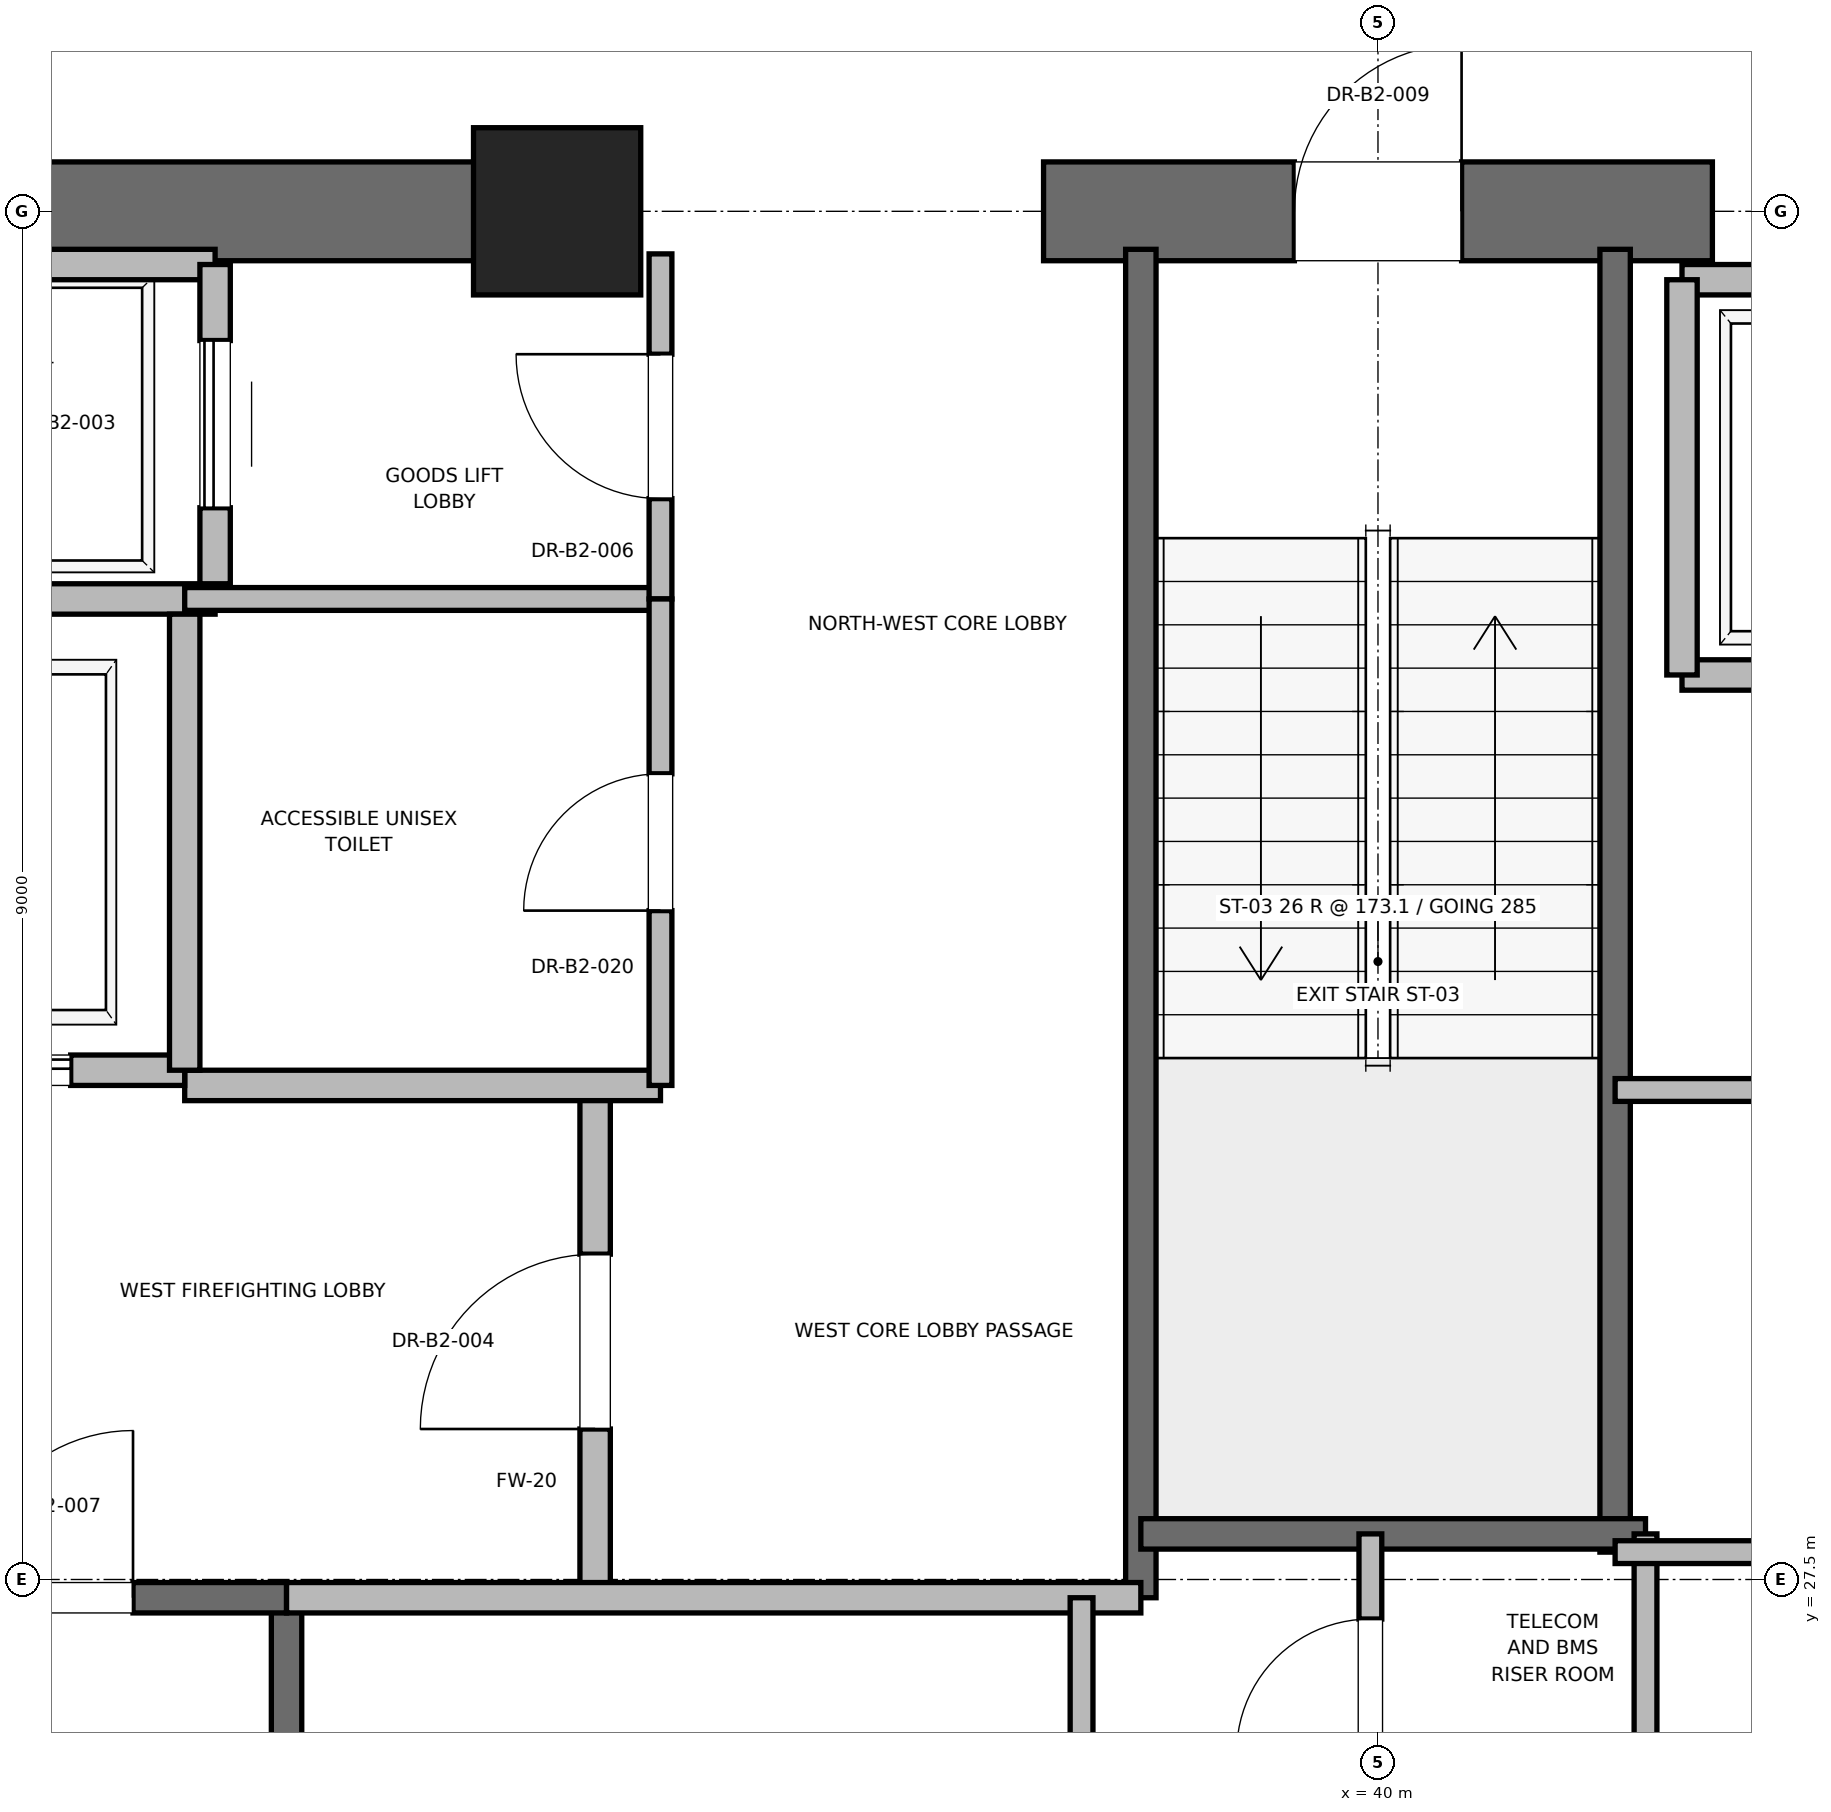
"""IFC4 building model, lengths in metres.
Left out: names, types, materials, properties, quantities, classifications, styles, units other than length and angle.
Written with IfcOpenShell. Run it as: python <this file> out.ifc"""

import sys

from ifc_helpers import new_model, si_unit, direction, frame, frame_2d, origin, origin_2d, place, context, subcontext, project, spatial, rectangle, extrude, element, fill, save


model = new_model("IFC4")
c1 = context("Model", 3, precision=1e-05, world=origin(), true_north=direction((0.0, 1.0)))
c2 = subcontext(c1, "Body", "Model", "MODEL_VIEW")
j1 = project(units=[si_unit("LENGTHUNIT", "METRE"), si_unit("PLANEANGLEUNIT", "RADIAN")], contexts=[c1])
p1 = place(None, origin())
s1 = spatial("IfcSite", under=j1, at=p1, CompositionType="ELEMENT")
p2 = place(p1, origin())
s2 = spatial("IfcBuilding", under=s1, at=p2, CompositionType="ELEMENT")
p3 = place(p2, frame((0.0, 0.0, -9.0)))
s3 = spatial("IfcBuildingStorey", under=s2, at=p3, CompositionType="ELEMENT", Elevation=-9.0)
p4 = place(p3, frame((34.6, 36.5, -0.3), z_axis=(0.0, 0.0, 1.0), x_axis=(1.0, 0.0, 0.0)))
e1 = element("IfcColumn", 1, at=p4, inside=s3, PredefinedType="PILASTER", context=c2, shape_type="SweptSolid", body=[
    extrude(rectangle(XDim=1.1, YDim=1.1, at=origin_2d()), origin(), (0.0, 0.0, 1.0), 4.8),
])
p5 = place(p3, frame((29.0, 36.5, -0.3), z_axis=(0.0, 0.0, 1.0), x_axis=(1.0, 0.0, 0.0)))
e2 = element("IfcWall", 2, at=p5, inside=s3, PredefinedType="SHEAR", context=c2, shape_type="SweptSolid", body=[
    extrude(rectangle(XDim=5.8, YDim=0.65, at=frame_2d((2.9, 0.0))), origin(), (0.0, 0.0, 1.0), 4.5),
])
p6 = place(p3, frame((37.8, 36.5, -0.3), z_axis=(0.0, 0.0, 1.0), x_axis=(1.0, 0.0, 0.0)))
e3 = element("IfcWall", 3, at=p6, inside=s3, PredefinedType="SHEAR", context=c2, shape_type="SweptSolid", body=[
    extrude(rectangle(XDim=4.4, YDim=0.65, at=frame_2d((2.2, 0.0))), origin(), (0.0, 0.0, 1.0), 4.5),
])
p7 = place(p6, frame((1.65, 0.0, 0.3)))
e4 = element("IfcOpeningElement", 4, at=p7, cuts=e3, PredefinedType="OPENING", context=c2, shape_type="SweptSolid", body=[
    extrude(rectangle(XDim=1.1, YDim=2.15, at=frame_2d((0.55, 1.075))), frame((0.0, 0.325, 0.0), z_axis=(0.0, -1.0, 0.0), x_axis=(1.0, 0.0, 0.0)), (0.0, 0.0, 1.0), 0.65),
])
p8 = place(p3, frame((32.82, 18.6, -0.3), z_axis=(0.0, 0.0, 1.0), x_axis=(0.0, 1.0, 0.0)))
e5 = element("IfcWall", 5, at=p8, inside=s3, PredefinedType="SOLIDWALL", context=c2, shape_type="SweptSolid", body=[
    extrude(rectangle(XDim=8.78, YDim=0.2, at=frame_2d((4.39, 0.0))), origin(), (0.0, 0.0, 1.0), 4.5),
])
p9 = place(p3, frame((29.7, 27.38, -0.3), z_axis=(0.0, 0.0, 1.0), x_axis=(1.0, 0.0, 0.0)))
e6 = element("IfcWall", 6, at=p9, inside=s3, PredefinedType="SOLIDWALL", context=c2, shape_type="SweptSolid", body=[
    extrude(rectangle(XDim=3.12, YDim=0.2, at=frame_2d((1.56, 0.0))), origin(), (0.0, 0.0, 1.0), 4.5),
])
p10 = place(p9, frame((1.01, 0.0, 0.3)))
e7 = element("IfcOpeningElement", 7, at=p10, cuts=e6, PredefinedType="OPENING", context=c2, shape_type="SweptSolid", body=[
    extrude(rectangle(XDim=1.1, YDim=2.15, at=frame_2d((0.55, 1.075))), frame((0.0, 0.1, 0.0), z_axis=(0.0, -1.0, 0.0), x_axis=(1.0, 0.0, 0.0)), (0.0, 0.0, 1.0), 0.2),
])
p11 = place(p3, frame((38.44, 27.38, -0.3), z_axis=(0.0, 0.0, 1.0), x_axis=(0.0, 1.0, 0.0)))
e8 = element("IfcWall", 8, at=p11, inside=s3, PredefinedType="SOLIDWALL", context=c2, shape_type="SweptSolid", body=[
    extrude(rectangle(XDim=8.87, YDim=0.2, at=frame_2d((4.435, 0.0))), origin(), (0.0, 0.0, 1.0), 4.5),
])
p12 = place(p3, frame((41.56, 27.68, -0.3), z_axis=(0.0, 0.0, 1.0), x_axis=(0.0, 1.0, 0.0)))
e9 = element("IfcWall", 9, at=p12, inside=s3, PredefinedType="SOLIDWALL", context=c2, shape_type="SweptSolid", body=[
    extrude(rectangle(XDim=8.57, YDim=0.2, at=frame_2d((4.285, 0.0))), origin(), (0.0, 0.0, 1.0), 4.5),
])
p13 = place(p3, frame((38.44, 27.8, -0.3), z_axis=(0.0, 0.0, 1.0), x_axis=(1.0, 0.0, 0.0)))
e10 = element("IfcWall", 10, at=p13, inside=s3, PredefinedType="SOLIDWALL", context=c2, shape_type="SweptSolid", body=[
    extrude(rectangle(XDim=3.32, YDim=0.2, at=frame_2d((1.66, 0.0))), origin(), (0.0, 0.0, 1.0), 4.5),
])
p14 = place(p3, frame((34.85, 27.38, 0.0), z_axis=(0.0, 0.0, 1.0), x_axis=(0.0, 1.0, 0.0)))
e11 = element("IfcWall", 11, at=p14, inside=s3, PredefinedType="PARTITIONING", context=c2, shape_type="SweptSolid", body=[
    extrude(rectangle(XDim=3.37, YDim=0.2, at=frame_2d((1.685, 0.0))), origin(), (0.0, 0.0, 1.0), 4.2),
])
p15 = place(p14, frame((1.11, 0.0, 0.0)))
e12 = element("IfcOpeningElement", 12, at=p15, cuts=e11, PredefinedType="OPENING", context=c2, shape_type="SweptSolid", body=[
    extrude(rectangle(XDim=1.15, YDim=2.2, at=frame_2d((0.575, 1.1))), frame((0.0, 0.1, 0.0), z_axis=(0.0, -1.0, 0.0), x_axis=(1.0, 0.0, 0.0)), (0.0, 0.0, 1.0), 0.2),
])
p16 = place(p3, frame((32.82, 27.38, 0.0), z_axis=(0.0, 0.0, 1.0), x_axis=(1.0, 0.0, 0.0)))
e13 = element("IfcWall", 13, at=p16, inside=s3, PredefinedType="PARTITIONING", context=c2, shape_type="SweptSolid", body=[
    extrude(rectangle(XDim=5.62, YDim=0.2, at=frame_2d((2.81, 0.0))), origin(), (0.0, 0.0, 1.0), 4.2),
])
p17 = place(p3, frame((32.15, 30.75, 0.0), z_axis=(0.0, 0.0, 1.0), x_axis=(1.0, 0.0, 0.0)))
e14 = element("IfcWall", 14, at=p17, inside=s3, PredefinedType="PARTITIONING", context=c2, shape_type="SweptSolid", body=[
    extrude(rectangle(XDim=3.13, YDim=0.2, at=frame_2d((1.565, 0.0))), origin(), (0.0, 0.0, 1.0), 4.2),
])
p18 = place(p3, frame((29.55, 30.85, 0.0), z_axis=(0.0, 0.0, 1.0), x_axis=(1.0, 0.0, 0.0)))
e15 = element("IfcWall", 15, at=p18, inside=s3, PredefinedType="SOLIDWALL", context=c2, shape_type="SweptSolid", body=[
    extrude(rectangle(XDim=2.6, YDim=0.2, at=frame_2d((1.3, 0.0))), origin(), (0.0, 0.0, 1.0), 2.98),
])
p19 = place(p18, frame((0.75, 0.0, 0.0)))
e16 = element("IfcOpeningElement", 16, at=p19, cuts=e15, PredefinedType="OPENING", context=c2, shape_type="SweptSolid", body=[
    extrude(rectangle(XDim=1.1, YDim=2.2, at=frame_2d((0.55, 1.1))), frame((0.0, 0.1, 0.0), z_axis=(0.0, -1.0, 0.0), x_axis=(1.0, 0.0, 0.0)), (0.0, 0.0, 1.0), 0.2),
])
p20 = place(p3, frame((29.55, 33.95, 0.0), z_axis=(0.0, 0.0, 1.0), x_axis=(1.0, 0.0, 0.0)))
e17 = element("IfcWall", 17, at=p20, inside=s3, PredefinedType="SOLIDWALL", context=c2, shape_type="SweptSolid", body=[
    extrude(rectangle(XDim=2.8, YDim=0.2, at=frame_2d((1.4, 0.0))), origin(), (0.0, 0.0, 1.0), 4.2),
])
p21 = place(p3, frame((32.15, 30.85, 0.0), z_axis=(0.0, 0.0, 1.0), x_axis=(0.0, 1.0, 0.0)))
e18 = element("IfcWall", 18, at=p21, inside=s3, PredefinedType="SOLIDWALL", context=c2, shape_type="SweptSolid", body=[
    extrude(rectangle(XDim=3.0, YDim=0.2, at=frame_2d((1.5, 0.0))), origin(), (0.0, 0.0, 1.0), 4.2),
])
p22 = place(p3, frame((32.35, 36.15, 0.0), z_axis=(0.0, 0.0, 1.0), x_axis=(-1.0, 0.0, 0.0)))
e19 = element("IfcWall", 19, at=p22, inside=s3, PredefinedType="SOLIDWALL", context=c2, shape_type="SweptSolid", body=[
    extrude(rectangle(XDim=2.8, YDim=0.2, at=frame_2d((1.4, 0.0))), origin(), (0.0, 0.0, 1.0), 3.38),
])
p23 = place(p3, frame((32.35, 34.05, 0.0), z_axis=(0.0, 0.0, 1.0), x_axis=(0.0, 1.0, 0.0)))
e20 = element("IfcWall", 20, at=p23, inside=s3, PredefinedType="SOLIDWALL", context=c2, shape_type="SweptSolid", body=[
    extrude(rectangle(XDim=2.1, YDim=0.2, at=frame_2d((1.05, 0.0))), origin(), (0.0, 0.0, 1.0), 4.2),
])
p24 = place(p23, frame((0.5, 0.0, 0.0)))
e21 = element("IfcOpeningElement", 21, at=p24, cuts=e20, PredefinedType="OPENING", context=c2, shape_type="SweptSolid", body=[
    extrude(rectangle(XDim=1.1, YDim=2.2, at=frame_2d((0.55, 1.1))), frame((0.0, 0.1, 0.0), z_axis=(0.0, -1.0, 0.0), x_axis=(1.0, 0.0, 0.0)), (0.0, 0.0, 1.0), 0.2),
])
p25 = place(p3, frame((42.0, 33.45, 0.0), z_axis=(0.0, 0.0, 1.0), x_axis=(1.0, 0.0, 0.0)))
e22 = element("IfcWall", 22, at=p25, inside=s3, PredefinedType="SOLIDWALL", context=c2, shape_type="SweptSolid", body=[
    extrude(rectangle(XDim=2.3, YDim=0.2, at=frame_2d((1.15, 0.0))), origin(), (0.0, 0.0, 1.0), 4.2),
])
p26 = place(p25, frame((0.6, 0.0, 0.0)))
e23 = element("IfcOpeningElement", 23, at=p26, cuts=e22, PredefinedType="OPENING", context=c2, shape_type="SweptSolid", body=[
    extrude(rectangle(XDim=1.1, YDim=2.2, at=frame_2d((0.55, 1.1))), frame((0.0, 0.1, 0.0), z_axis=(0.0, -1.0, 0.0), x_axis=(1.0, 0.0, 0.0)), (0.0, 0.0, 1.0), 0.2),
])
p27 = place(p3, frame((44.3, 36.05, 0.0), z_axis=(0.0, 0.0, 1.0), x_axis=(-1.0, 0.0, 0.0)))
e24 = element("IfcWall", 24, at=p27, inside=s3, PredefinedType="SOLIDWALL", context=c2, shape_type="SweptSolid", body=[
    extrude(rectangle(XDim=2.3, YDim=0.2, at=frame_2d((1.15, 0.0))), origin(), (0.0, 0.0, 1.0), 2.98),
])
p28 = place(p3, frame((42.0, 36.05, 0.0), z_axis=(0.0, 0.0, 1.0), x_axis=(0.0, -1.0, 0.0)))
e25 = element("IfcWall", 25, at=p28, inside=s3, PredefinedType="SOLIDWALL", context=c2, shape_type="SweptSolid", body=[
    extrude(rectangle(XDim=2.6, YDim=0.2, at=frame_2d((1.3, 0.0))), origin(), (0.0, 0.0, 1.0), 2.98),
])
p29 = place(p3, frame((41.76, 23.8, 0.0), z_axis=(0.0, 0.0, 1.0), x_axis=(0.0, 1.0, 0.0)))
e26 = element("IfcWall", 26, at=p29, inside=s3, PredefinedType="PARTITIONING", context=c2, shape_type="SweptSolid", body=[
    extrude(rectangle(XDim=4.0, YDim=0.15, at=frame_2d((2.0, 0.0))), origin(), (0.0, 0.0, 1.0), 2.85),
])
p30 = place(p3, frame((39.95, 25.8, 0.0), z_axis=(0.0, 0.0, 1.0), x_axis=(0.0, 1.0, 0.0)))
e27 = element("IfcWall", 27, at=p30, inside=s3, PredefinedType="PARTITIONING", context=c2, shape_type="SweptSolid", body=[
    extrude(rectangle(XDim=2.0, YDim=0.15, at=frame_2d((1.0, 0.0))), origin(), (0.0, 0.0, 1.0), 2.85),
])
p31 = place(p30, frame((0.56, 0.0, 0.0)))
e28 = element("IfcOpeningElement", 28, at=p31, cuts=e27, PredefinedType="OPENING", context=c2, shape_type="SweptSolid", body=[
    extrude(rectangle(XDim=0.88, YDim=2.1, at=frame_2d((0.44, 1.05))), frame((0.0, 0.075, 0.0), z_axis=(0.0, -1.0, 0.0), x_axis=(1.0, 0.0, 0.0)), (0.0, 0.0, 1.0), 0.15),
])
p32 = place(p3, frame((32.15, 33.95, 0.0), z_axis=(0.0, 0.0, 1.0), x_axis=(1.0, 0.0, 0.0)))
e29 = element("IfcWall", 29, at=p32, inside=s3, PredefinedType="PARTITIONING", context=c2, shape_type="SweptSolid", body=[
    extrude(rectangle(XDim=3.13, YDim=0.15, at=frame_2d((1.565, 0.0))), origin(), (0.0, 0.0, 1.0), 2.85),
])
p33 = place(p3, frame((35.28, 33.95, 0.0), z_axis=(0.0, 0.0, 1.0), x_axis=(0.0, 1.0, 0.0)))
e30 = element("IfcWall", 30, at=p33, inside=s3, PredefinedType="PARTITIONING", context=c2, shape_type="SweptSolid", body=[
    extrude(rectangle(XDim=2.27, YDim=0.15, at=frame_2d((1.135, 0.0))), origin(), (0.0, 0.0, 1.0), 2.85),
])
p34 = place(p33, frame((0.66, 0.0, 0.0)))
e31 = element("IfcOpeningElement", 31, at=p34, cuts=e30, PredefinedType="OPENING", context=c2, shape_type="SweptSolid", body=[
    extrude(rectangle(XDim=0.95, YDim=2.15, at=frame_2d((0.475, 1.075))), frame((0.0, 0.075, 0.0), z_axis=(0.0, -1.0, 0.0), x_axis=(1.0, 0.0, 0.0)), (0.0, 0.0, 1.0), 0.15),
])
p35 = place(p3, frame((35.28, 30.75, 0.0), z_axis=(0.0, 0.0, 1.0), x_axis=(0.0, 1.0, 0.0)))
e32 = element("IfcWall", 32, at=p35, inside=s3, PredefinedType="PARTITIONING", context=c2, shape_type="SweptSolid", body=[
    extrude(rectangle(XDim=3.2, YDim=0.15, at=frame_2d((1.6, 0.0))), origin(), (0.0, 0.0, 1.0), 2.85),
])
p36 = place(p35, frame((1.15, 0.0, 0.0)))
e33 = element("IfcOpeningElement", 33, at=p36, cuts=e32, PredefinedType="OPENING", context=c2, shape_type="SweptSolid", body=[
    extrude(rectangle(XDim=0.9, YDim=2.1, at=frame_2d((0.45, 1.05))), frame((0.0, 0.075, 0.0), z_axis=(0.0, -1.0, 0.0), x_axis=(1.0, 0.0, 0.0)), (0.0, 0.0, 1.0), 0.15),
])
p37 = place(p3, frame((38.05, 18.6, 0.0), z_axis=(0.0, 0.0, 1.0), x_axis=(0.0, 1.0, 0.0)))
e34 = element("IfcWall", 34, at=p37, inside=s3, PredefinedType="PARTITIONING", context=c2, shape_type="SweptSolid", body=[
    extrude(rectangle(XDim=8.78, YDim=0.15, at=frame_2d((4.39, 0.0))), origin(), (0.0, 0.0, 1.0), 2.85),
])
p38 = place(p37, frame((3.95, 0.0, 0.0)))
e35 = element("IfcOpeningElement", 35, at=p38, cuts=e34, PredefinedType="OPENING", context=c2, shape_type="SweptSolid", body=[
    extrude(rectangle(XDim=0.88, YDim=2.1, at=frame_2d((0.44, 1.05))), frame((0.0, 0.075, 0.0), z_axis=(0.0, -1.0, 0.0), x_axis=(1.0, 0.0, 0.0)), (0.0, 0.0, 1.0), 0.15),
])
p39 = place(p3, frame((41.56, 27.68, 0.0), z_axis=(0.0, 0.0, 1.0), x_axis=(1.0, 0.0, 0.0)))
e36 = element("IfcWall", 36, at=p39, inside=s3, PredefinedType="PARTITIONING", context=c2, shape_type="SweptSolid", body=[
    extrude(rectangle(XDim=3.59, YDim=0.15, at=frame_2d((1.795, 0.0))), origin(), (0.0, 0.0, 1.0), 2.85),
])
p40 = place(p3, frame((41.56, 30.72, 0.0), z_axis=(0.0, 0.0, 1.0), x_axis=(1.0, 0.0, 0.0)))
e37 = element("IfcWall", 37, at=p40, inside=s3, PredefinedType="PARTITIONING", context=c2, shape_type="SweptSolid", body=[
    extrude(rectangle(XDim=3.59, YDim=0.15, at=frame_2d((1.795, 0.0))), origin(), (0.0, 0.0, 1.0), 2.85),
])
p41 = place(p40, frame((1.355, 0.0, 0.0)))
e38 = element("IfcOpeningElement", 38, at=p41, cuts=e37, PredefinedType="OPENING", context=c2, shape_type="SweptSolid", body=[
    extrude(rectangle(XDim=0.88, YDim=2.1, at=frame_2d((0.44, 1.05))), frame((0.0, 0.075, 0.0), z_axis=(0.0, -1.0, 0.0), x_axis=(1.0, 0.0, 0.0)), (0.0, 0.0, 1.0), 0.15),
])
p42 = place(p10, origin())
e39 = element("IfcDoor", 39, at=p42, inside=s3, OperationType="SINGLE_SWING_RIGHT", PredefinedType="DOOR", context=c2, shape_type="SweptSolid", body=[
    extrude(rectangle(XDim=1.1, YDim=2.15, at=frame_2d((0.55, 1.075))), frame((0.0, 0.025, 0.0), z_axis=(0.0, -1.0, 0.0), x_axis=(1.0, 0.0, 0.0)), (0.0, 0.0, 1.0), 0.05),
])
fill(e7, e39)
p43 = place(p7, origin())
e40 = element("IfcDoor", 40, at=p43, inside=s3, OperationType="SINGLE_SWING_RIGHT", PredefinedType="DOOR", context=c2, shape_type="SweptSolid", body=[
    extrude(rectangle(XDim=1.1, YDim=2.15, at=frame_2d((0.55, 1.075))), frame((0.0, 0.025, 0.0), z_axis=(0.0, -1.0, 0.0), x_axis=(1.0, 0.0, 0.0)), (0.0, 0.0, 1.0), 0.05),
])
fill(e4, e40)
p44 = place(p15, origin())
e41 = element("IfcDoor", 41, at=p44, inside=s3, OperationType="SINGLE_SWING_LEFT", PredefinedType="DOOR", context=c2, shape_type="SweptSolid", body=[
    extrude(rectangle(XDim=1.15, YDim=2.2, at=frame_2d((0.575, 1.1))), frame((0.0, 0.025, 0.0), z_axis=(0.0, -1.0, 0.0), x_axis=(1.0, 0.0, 0.0)), (0.0, 0.0, 1.0), 0.05),
])
fill(e12, e41)
p45 = place(p19, origin())
e42 = element("IfcDoor", 42, at=p45, inside=s3, OperationType="SLIDING_TO_RIGHT", PredefinedType="DOOR", context=c2, shape_type="SweptSolid", body=[
    extrude(rectangle(XDim=1.1, YDim=2.2, at=frame_2d((0.55, 1.1))), frame((0.0, 0.025, 0.0), z_axis=(0.0, -1.0, 0.0), x_axis=(1.0, 0.0, 0.0)), (0.0, 0.0, 1.0), 0.05),
])
fill(e16, e42)
p46 = place(p24, origin())
e43 = element("IfcDoor", 43, at=p46, inside=s3, OperationType="SLIDING_TO_RIGHT", PredefinedType="DOOR", context=c2, shape_type="SweptSolid", body=[
    extrude(rectangle(XDim=1.1, YDim=2.2, at=frame_2d((0.55, 1.1))), frame((0.0, 0.025, 0.0), z_axis=(0.0, -1.0, 0.0), x_axis=(1.0, 0.0, 0.0)), (0.0, 0.0, 1.0), 0.05),
])
fill(e21, e43)
p47 = place(p31, origin())
e44 = element("IfcDoor", 44, at=p47, inside=s3, OperationType="SINGLE_SWING_LEFT", PredefinedType="DOOR", context=c2, shape_type="SweptSolid", body=[
    extrude(rectangle(XDim=0.88, YDim=2.1, at=frame_2d((0.44, 1.05))), frame((0.0, 0.025, 0.0), z_axis=(0.0, -1.0, 0.0), x_axis=(1.0, 0.0, 0.0)), (0.0, 0.0, 1.0), 0.05),
])
fill(e28, e44)
p48 = place(p34, origin())
e45 = element("IfcDoor", 45, at=p48, inside=s3, OperationType="SINGLE_SWING_RIGHT", PredefinedType="DOOR", context=c2, shape_type="SweptSolid", body=[
    extrude(rectangle(XDim=0.95, YDim=2.15, at=frame_2d((0.475, 1.075))), frame((0.0, 0.025, 0.0), z_axis=(0.0, -1.0, 0.0), x_axis=(1.0, 0.0, 0.0)), (0.0, 0.0, 1.0), 0.05),
])
fill(e31, e45)
p49 = place(p36, origin())
e46 = element("IfcDoor", 46, at=p49, inside=s3, OperationType="SINGLE_SWING_LEFT", PredefinedType="DOOR", context=c2, shape_type="SweptSolid", body=[
    extrude(rectangle(XDim=0.9, YDim=2.1, at=frame_2d((0.45, 1.05))), frame((0.0, 0.025, 0.0), z_axis=(0.0, -1.0, 0.0), x_axis=(1.0, 0.0, 0.0)), (0.0, 0.0, 1.0), 0.05),
])
fill(e33, e46)
save(model, sys.argv[1])
